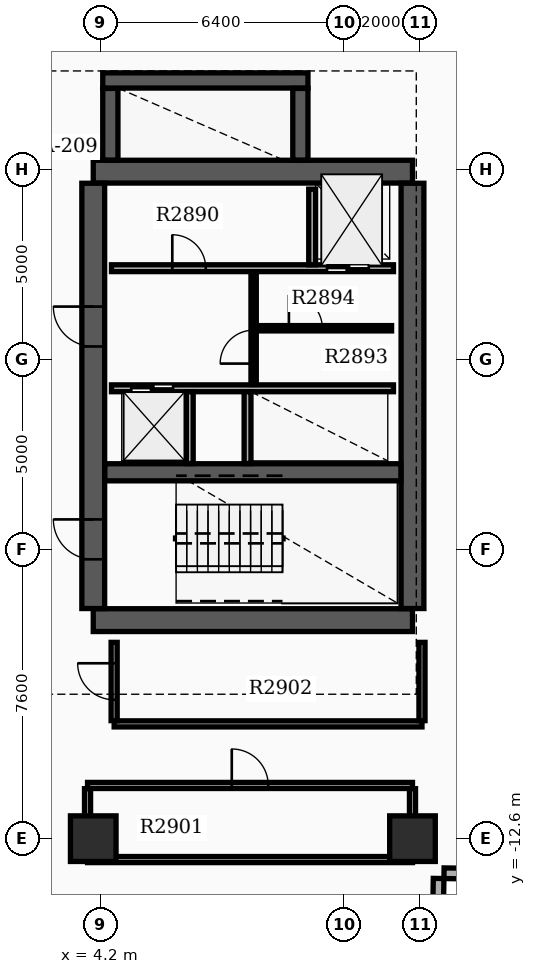
"""IFC4 building model, lengths in metres.
Left out: names, types, materials, properties, quantities, classifications, styles, units other than length and angle.
Written with IfcOpenShell. Run it as: python <this file> out.ifc"""

import sys

from ifc_helpers import new_model, si_unit, direction, frame, frame_2d, origin, origin_2d, place, context, subcontext, project, spatial, rectangle, extrude, element, fill, save


model = new_model("IFC4")
c1 = context("Model", 3, precision=1e-05, world=origin(), true_north=direction((0.0, 1.0)))
c2 = subcontext(c1, "Body", "Model", "MODEL_VIEW")
j1 = project(units=[si_unit("LENGTHUNIT", "METRE"), si_unit("PLANEANGLEUNIT", "RADIAN")], contexts=[c1])
p1 = place(None, origin())
s1 = spatial("IfcSite", under=j1, at=p1, CompositionType="ELEMENT")
p2 = place(p1, origin())
s2 = spatial("IfcBuilding", under=s1, at=p2, CompositionType="ELEMENT")
p3 = place(p2, frame((0.0, 0.0, 180.0)))
s3 = spatial("IfcBuildingStorey", under=s2, at=p3, CompositionType="ELEMENT", Elevation=180.0)
for number, where, z_axis, x_axis in (
    (1, (4.0, -6.85, 0.0), (0.0, 0.0, 1.0), (1.0, 0.0, 0.0)),
    (2, (4.0, 4.95, 0.0), (0.0, 0.0, 1.0), (1.0, 0.0, 0.0)),
):
    element("IfcWall", number, at=place(p3, frame(where, z_axis=z_axis, x_axis=x_axis)), inside=s3, PredefinedType="SHEAR", context=c2, shape_type="SweptSolid", body=[
        extrude(rectangle(XDim=8.4, YDim=0.6, at=frame_2d((4.2, 0.0))), origin(), (0.0, 0.0, 1.0), 3.7),
    ])
p4 = place(p3, frame((4.0, -6.545, 0.0), z_axis=(0.0, 0.0, 1.0), x_axis=(0.0, 1.0, 0.0)))
e3 = element("IfcWall", 3, at=p4, inside=s3, PredefinedType="SHEAR", context=c2, shape_type="SweptSolid", body=[
    extrude(rectangle(XDim=11.19, YDim=0.6, at=frame_2d((5.595, 0.0))), origin(), (0.0, 0.0, 1.0), 3.7),
])
p5 = place(p4, frame((1.295, 0.0, 0.0)))
e4 = element("IfcOpeningElement", 4, at=p5, cuts=e3, PredefinedType="OPENING", context=c2, shape_type="SweptSolid", body=[
    extrude(rectangle(XDim=1.05, YDim=2.15, at=frame_2d((0.525, 1.075))), frame((0.0, 0.31, 0.0), z_axis=(0.0, -1.0, 0.0), x_axis=(1.0, 0.0, 0.0)), (0.0, 0.0, 1.0), 0.62),
])
p6 = place(p4, frame((6.895, 0.0, 0.0)))
e5 = element("IfcOpeningElement", 5, at=p6, cuts=e3, PredefinedType="OPENING", context=c2, shape_type="SweptSolid", body=[
    extrude(rectangle(XDim=1.05, YDim=2.15, at=frame_2d((0.525, 1.075))), frame((0.0, 0.31, 0.0), z_axis=(0.0, -1.0, 0.0), x_axis=(1.0, 0.0, 0.0)), (0.0, 0.0, 1.0), 0.62),
])
p7 = place(p3, frame((12.4, -6.545, 0.0), z_axis=(0.0, 0.0, 1.0), x_axis=(0.0, 1.0, 0.0)))
e6 = element("IfcWall", 6, at=p7, inside=s3, PredefinedType="SHEAR", context=c2, shape_type="SweptSolid", body=[
    extrude(rectangle(XDim=11.19, YDim=0.6, at=frame_2d((5.595, 0.0))), origin(), (0.0, 0.0, 1.0), 3.7),
])
p8 = place(p3, frame((4.305, -2.96, 0.0), z_axis=(0.0, 0.0, 1.0), x_axis=(1.0, 0.0, 0.0)))
e7 = element("IfcWall", 7, at=p8, inside=s3, PredefinedType="SHEAR", context=c2, shape_type="SweptSolid", body=[
    extrude(rectangle(XDim=7.79, YDim=0.45, at=frame_2d((3.895, 0.0))), origin(), (0.0, 0.0, 1.0), 3.7),
])
p9 = place(p3, frame((4.45, 5.255, 0.0), z_axis=(0.0, 0.0, 1.0), x_axis=(0.0, 1.0, 0.0)))
e8 = element("IfcWall", 8, at=p9, inside=s3, PredefinedType="SHEAR", context=c2, shape_type="SweptSolid", body=[
    extrude(rectangle(XDim=1.885, YDim=0.4, at=frame_2d((0.942, 0.0))), origin(), (0.0, 0.0, 1.0), 3.7),
])
p10 = place(p3, frame((4.25, 7.35, 0.0), z_axis=(0.0, 0.0, 1.0), x_axis=(1.0, 0.0, 0.0)))
e9 = element("IfcWall", 9, at=p10, inside=s3, PredefinedType="SHEAR", context=c2, shape_type="SweptSolid", body=[
    extrude(rectangle(XDim=5.4, YDim=0.4, at=frame_2d((2.7, 0.0))), origin(), (0.0, 0.0, 1.0), 3.7),
])
p11 = place(p3, frame((9.45, 5.255, 0.0), z_axis=(0.0, 0.0, 1.0), x_axis=(0.0, 1.0, 0.0)))
e10 = element("IfcWall", 10, at=p11, inside=s3, PredefinedType="SHEAR", context=c2, shape_type="SweptSolid", body=[
    extrude(rectangle(XDim=1.885, YDim=0.4, at=frame_2d((0.942, 0.0))), origin(), (0.0, 0.0, 1.0), 3.7),
])
for number, where, z_axis, x_axis in (
    (11, (12.4, -12.6, 0.0), (0.0, 0.0, 1.0), (1.0, 0.0, 0.0)),
    (12, (4.0, -12.6, 0.0), (0.0, 0.0, 1.0), (1.0, 0.0, 0.0)),
):
    element("IfcColumn", number, at=place(p3, frame(where, z_axis=z_axis, x_axis=x_axis)), inside=s3, PredefinedType="COLUMN", context=c2, shape_type="SweptSolid", body=[
        extrude(rectangle(XDim=1.2, YDim=1.2, at=origin_2d()), origin(), (0.0, 0.0, 1.0), 3.9),
    ])
p12 = place(p3, frame((14.449, -13.529, 0.0), z_axis=(0.0, 0.0, 1.0), x_axis=(-0.999878147354, 0.015610587569, 0.0)))
e13 = element("IfcWall", 13, at=p12, inside=s3, PredefinedType="STANDARD", context=c2, shape_type="SweptSolid", body=[
    extrude(rectangle(XDim=1.22, YDim=0.28, at=frame_2d((0.61, 0.0))), origin(), (0.0, 0.0, 1.0), 2.97),
])
p13 = place(p3, frame((13.087, -13.647, 0.0), z_axis=(0.0, 0.0, 1.0), x_axis=(-0.015785793208, -0.999875396603, 0.0)))
e14 = element("IfcWall", 14, at=p13, inside=s3, PredefinedType="STANDARD", context=c2, shape_type="SweptSolid", body=[
    extrude(rectangle(XDim=1.5, YDim=0.28, at=frame_2d((0.75, 0.0))), origin(), (0.0, 0.0, 1.0), 2.97),
])
p14 = place(p3, frame((4.48, 2.41, 0.0), z_axis=(0.0, 0.0, 1.0), x_axis=(1.0, 0.0, 0.0)))
e15 = element("IfcWall", 15, at=p14, inside=s3, PredefinedType="SOLIDWALL", context=c2, shape_type="SweptSolid", body=[
    extrude(rectangle(XDim=7.42, YDim=0.18, at=frame_2d((3.71, 0.0))), origin(), (0.0, 0.0, 1.0), 2.96),
])
p15 = place(p14, frame((5.67, 0.0, 0.0)))
e16 = element("IfcOpeningElement", 16, at=p15, cuts=e15, PredefinedType="OPENING", context=c2, shape_type="SweptSolid", body=[
    extrude(rectangle(XDim=1.1, YDim=2.15, at=frame_2d((0.55, 1.075))), frame((0.0, 0.1, 0.0), z_axis=(0.0, -1.0, 0.0), x_axis=(1.0, 0.0, 0.0)), (0.0, 0.0, 1.0), 0.2),
])
p16 = place(p14, frame((1.6, 0.0, 0.0)))
e17 = element("IfcOpeningElement", 17, at=p16, cuts=e15, PredefinedType="OPENING", context=c2, shape_type="SweptSolid", body=[
    extrude(rectangle(XDim=0.88, YDim=2.1, at=frame_2d((0.44, 1.05))), frame((0.0, 0.1, 0.0), z_axis=(0.0, -1.0, 0.0), x_axis=(1.0, 0.0, 0.0)), (0.0, 0.0, 1.0), 0.2),
])
p17 = place(p3, frame((4.48, -0.75, 0.0), z_axis=(0.0, 0.0, 1.0), x_axis=(1.0, 0.0, 0.0)))
e18 = element("IfcWall", 18, at=p17, inside=s3, PredefinedType="SOLIDWALL", context=c2, shape_type="SweptSolid", body=[
    extrude(rectangle(XDim=7.42, YDim=0.18, at=frame_2d((3.71, 0.0))), origin(), (0.0, 0.0, 1.0), 2.96),
])
p18 = place(p17, frame((0.52, 0.0, 0.0)))
e19 = element("IfcOpeningElement", 19, at=p18, cuts=e18, PredefinedType="OPENING", context=c2, shape_type="SweptSolid", body=[
    extrude(rectangle(XDim=1.1, YDim=2.15, at=frame_2d((0.55, 1.075))), frame((0.0, 0.1, 0.0), z_axis=(0.0, -1.0, 0.0), x_axis=(1.0, 0.0, 0.0)), (0.0, 0.0, 1.0), 0.2),
])
p19 = place(p3, frame((9.76, 2.5, 0.0), z_axis=(0.0, 0.0, 1.0), x_axis=(0.0, 1.0, 0.0)))
e20 = element("IfcWall", 20, at=p19, inside=s3, PredefinedType="SOLIDWALL", context=c2, shape_type="SweptSolid", body=[
    extrude(rectangle(XDim=1.99, YDim=0.18, at=frame_2d((0.995, 0.0))), origin(), (0.0, 0.0, 1.0), 2.96),
])
for number, where, z_axis, x_axis in (
    (21, (6.54, -2.73, 0.0), (0.0, 0.0, 1.0), (0.0, 1.0, 0.0)),
    (22, (8.06, -2.73, 0.0), (0.0, 0.0, 1.0), (0.0, 1.0, 0.0)),
):
    element("IfcWall", number, at=place(p3, frame(where, z_axis=z_axis, x_axis=x_axis)), inside=s3, PredefinedType="SOLIDWALL", context=c2, shape_type="SweptSolid", body=[
        extrude(rectangle(XDim=1.89, YDim=0.18, at=frame_2d((0.945, 0.0))), origin(), (0.0, 0.0, 1.0), 2.96),
    ])
p20 = place(p3, frame((8.22, -0.65, 0.0), z_axis=(0.0, 0.0, 1.0), x_axis=(0.0, 1.0, 0.0)))
e23 = element("IfcWall", 23, at=p20, inside=s3, PredefinedType="SOLIDWALL", context=c2, shape_type="SweptSolid", body=[
    extrude(rectangle(XDim=2.96, YDim=0.14, at=frame_2d((1.48, 0.0))), origin(), (0.0, 0.0, 1.0), 2.96),
])
p21 = place(p20, frame((0.55, 0.0, 0.0)))
e24 = element("IfcOpeningElement", 24, at=p21, cuts=e23, PredefinedType="OPENING", context=c2, shape_type="SweptSolid", body=[
    extrude(rectangle(XDim=0.88, YDim=2.1, at=frame_2d((0.44, 1.05))), frame((0.0, 0.08, 0.0), z_axis=(0.0, -1.0, 0.0), x_axis=(1.0, 0.0, 0.0)), (0.0, 0.0, 1.0), 0.16),
])
p22 = place(p3, frame((8.298, 0.83, 0.0), z_axis=(0.0, 0.0, 1.0), x_axis=(1.0, 0.0, 0.0)))
e25 = element("IfcWall", 25, at=p22, inside=s3, PredefinedType="PARTITIONING", context=c2, shape_type="SweptSolid", body=[
    extrude(rectangle(XDim=3.552, YDim=0.14, at=frame_2d((1.776, 0.0))), origin(), (0.0, 0.0, 1.0), 2.96),
])
p23 = place(p22, frame((0.85, 0.0, 0.0)))
e26 = element("IfcOpeningElement", 26, at=p23, cuts=e25, PredefinedType="OPENING", context=c2, shape_type="SweptSolid", body=[
    extrude(rectangle(XDim=0.88, YDim=2.1, at=frame_2d((0.44, 1.05))), frame((0.0, 0.08, 0.0), z_axis=(0.0, -1.0, 0.0), x_axis=(1.0, 0.0, 0.0)), (0.0, 0.0, 1.0), 0.16),
])
p24 = place(p3, frame((3.85, -13.15, 0.0), z_axis=(0.0, 0.0, 1.0), x_axis=(1.0, 0.0, 0.0)))
e27 = element("IfcWall", 27, at=p24, inside=s3, PredefinedType="PARTITIONING", context=c2, shape_type="SweptSolid", body=[
    extrude(rectangle(XDim=8.55, YDim=0.16, at=frame_2d((4.275, 0.0))), origin(), (0.0, 0.0, 1.0), 2.96),
])
p25 = place(p3, frame((3.85, -11.2, 0.0), z_axis=(0.0, 0.0, 1.0), x_axis=(1.0, 0.0, 0.0)))
e28 = element("IfcWall", 28, at=p25, inside=s3, PredefinedType="PARTITIONING", context=c2, shape_type="SweptSolid", body=[
    extrude(rectangle(XDim=8.55, YDim=0.16, at=frame_2d((4.275, 0.0))), origin(), (0.0, 0.0, 1.0), 2.96),
])
p26 = place(p25, frame((3.795, 0.0, 0.0)))
e29 = element("IfcOpeningElement", 29, at=p26, cuts=e28, PredefinedType="OPENING", context=c2, shape_type="SweptSolid", body=[
    extrude(rectangle(XDim=0.96, YDim=2.15, at=frame_2d((0.48, 1.075))), frame((0.0, 0.09, 0.0), z_axis=(0.0, -1.0, 0.0), x_axis=(1.0, 0.0, 0.0)), (0.0, 0.0, 1.0), 0.18),
])
for number, where, z_axis, x_axis in (
    (30, (3.85, -13.065, 0.0), (0.0, 0.0, 1.0), (0.0, 1.0, 0.0)),
    (31, (12.4, -13.065, 0.0), (0.0, 0.0, 1.0), (0.0, 1.0, 0.0)),
):
    element("IfcWall", number, at=place(p3, frame(where, z_axis=z_axis, x_axis=x_axis)), inside=s3, PredefinedType="PARTITIONING", context=c2, shape_type="SweptSolid", body=[
        extrude(rectangle(XDim=1.78, YDim=0.16, at=frame_2d((0.89, 0.0))), origin(), (0.0, 0.0, 1.0), 2.96),
    ])
p27 = place(p3, frame((4.55, -9.58, 0.0), z_axis=(0.0, 0.0, 1.0), x_axis=(1.0, 0.0, 0.0)))
e32 = element("IfcWall", 32, at=p27, inside=s3, PredefinedType="PARTITIONING", context=c2, shape_type="SweptSolid", body=[
    extrude(rectangle(XDim=8.1, YDim=0.16, at=frame_2d((4.05, 0.0))), origin(), (0.0, 0.0, 1.0), 2.96),
])
p28 = place(p3, frame((4.55, -9.495, 0.0), z_axis=(0.0, 0.0, 1.0), x_axis=(0.0, 1.0, 0.0)))
e33 = element("IfcWall", 33, at=p28, inside=s3, PredefinedType="PARTITIONING", context=c2, shape_type="SweptSolid", body=[
    extrude(rectangle(XDim=2.06, YDim=0.16, at=frame_2d((1.03, 0.0))), origin(), (0.0, 0.0, 1.0), 2.96),
])
p29 = place(p28, frame((0.55, 0.0, 0.0)))
e34 = element("IfcOpeningElement", 34, at=p29, cuts=e33, PredefinedType="OPENING", context=c2, shape_type="SweptSolid", body=[
    extrude(rectangle(XDim=0.96, YDim=2.15, at=frame_2d((0.48, 1.075))), frame((0.0, 0.09, 0.0), z_axis=(0.0, -1.0, 0.0), x_axis=(1.0, 0.0, 0.0)), (0.0, 0.0, 1.0), 0.18),
])
p30 = place(p3, frame((12.65, -9.495, 0.0), z_axis=(0.0, 0.0, 1.0), x_axis=(0.0, 1.0, 0.0)))
e35 = element("IfcWall", 35, at=p30, inside=s3, PredefinedType="PARTITIONING", context=c2, shape_type="SweptSolid", body=[
    extrude(rectangle(XDim=2.06, YDim=0.16, at=frame_2d((1.03, 0.0))), origin(), (0.0, 0.0, 1.0), 2.96),
])
p31 = place(p5, origin())
e36 = element("IfcDoor", 36, at=p31, inside=s3, OperationType="SINGLE_SWING_RIGHT", PredefinedType="DOOR", context=c2, shape_type="SweptSolid", body=[
    extrude(rectangle(XDim=1.05, YDim=2.15, at=frame_2d((0.525, 1.075))), frame((0.0, 0.025, 0.0), z_axis=(0.0, -1.0, 0.0), x_axis=(1.0, 0.0, 0.0)), (0.0, 0.0, 1.0), 0.05),
])
fill(e4, e36)
p32 = place(p6, origin())
e37 = element("IfcDoor", 37, at=p32, inside=s3, OperationType="SINGLE_SWING_RIGHT", PredefinedType="DOOR", context=c2, shape_type="SweptSolid", body=[
    extrude(rectangle(XDim=1.05, YDim=2.15, at=frame_2d((0.525, 1.075))), frame((0.0, 0.025, 0.0), z_axis=(0.0, -1.0, 0.0), x_axis=(1.0, 0.0, 0.0)), (0.0, 0.0, 1.0), 0.05),
])
fill(e5, e37)
p33 = place(p15, origin())
e38 = element("IfcDoor", 38, at=p33, inside=s3, OperationType="DOUBLE_DOOR_SLIDING", PredefinedType="DOOR", context=c2, shape_type="SweptSolid", body=[
    extrude(rectangle(XDim=1.1, YDim=2.15, at=frame_2d((0.55, 1.075))), frame((0.0, 0.025, 0.0), z_axis=(0.0, -1.0, 0.0), x_axis=(1.0, 0.0, 0.0)), (0.0, 0.0, 1.0), 0.05),
])
fill(e16, e38)
p34 = place(p18, origin())
e39 = element("IfcDoor", 39, at=p34, inside=s3, OperationType="DOUBLE_DOOR_SLIDING", PredefinedType="DOOR", context=c2, shape_type="SweptSolid", body=[
    extrude(rectangle(XDim=1.1, YDim=2.15, at=frame_2d((0.55, 1.075))), frame((0.0, 0.025, 0.0), z_axis=(0.0, -1.0, 0.0), x_axis=(1.0, 0.0, 0.0)), (0.0, 0.0, 1.0), 0.05),
])
fill(e19, e39)
p35 = place(p16, origin())
e40 = element("IfcDoor", 40, at=p35, inside=s3, OperationType="SINGLE_SWING_LEFT", PredefinedType="DOOR", context=c2, shape_type="SweptSolid", body=[
    extrude(rectangle(XDim=0.88, YDim=2.1, at=frame_2d((0.44, 1.05))), frame((0.0, 0.025, 0.0), z_axis=(0.0, -1.0, 0.0), x_axis=(1.0, 0.0, 0.0)), (0.0, 0.0, 1.0), 0.05),
])
fill(e17, e40)
p36 = place(p21, origin())
e41 = element("IfcDoor", 41, at=p36, inside=s3, OperationType="SINGLE_SWING_LEFT", PredefinedType="DOOR", context=c2, shape_type="SweptSolid", body=[
    extrude(rectangle(XDim=0.88, YDim=2.1, at=frame_2d((0.44, 1.05))), frame((0.0, 0.025, 0.0), z_axis=(0.0, -1.0, 0.0), x_axis=(1.0, 0.0, 0.0)), (0.0, 0.0, 1.0), 0.05),
])
fill(e24, e41)
p37 = place(p23, origin())
e42 = element("IfcDoor", 42, at=p37, inside=s3, OperationType="SINGLE_SWING_LEFT", PredefinedType="DOOR", context=c2, shape_type="SweptSolid", body=[
    extrude(rectangle(XDim=0.88, YDim=2.1, at=frame_2d((0.44, 1.05))), frame((0.0, 0.025, 0.0), z_axis=(0.0, -1.0, 0.0), x_axis=(1.0, 0.0, 0.0)), (0.0, 0.0, 1.0), 0.05),
])
fill(e26, e42)
p38 = place(p26, origin())
e43 = element("IfcDoor", 43, at=p38, inside=s3, OperationType="SINGLE_SWING_LEFT", PredefinedType="DOOR", context=c2, shape_type="SweptSolid", body=[
    extrude(rectangle(XDim=0.96, YDim=2.15, at=frame_2d((0.48, 1.075))), frame((0.0, 0.025, 0.0), z_axis=(0.0, -1.0, 0.0), x_axis=(1.0, 0.0, 0.0)), (0.0, 0.0, 1.0), 0.05),
])
fill(e29, e43)
p39 = place(p29, origin())
e44 = element("IfcDoor", 44, at=p39, inside=s3, OperationType="SINGLE_SWING_RIGHT", PredefinedType="DOOR", context=c2, shape_type="SweptSolid", body=[
    extrude(rectangle(XDim=0.96, YDim=2.15, at=frame_2d((0.48, 1.075))), frame((0.0, 0.025, 0.0), z_axis=(0.0, -1.0, 0.0), x_axis=(1.0, 0.0, 0.0)), (0.0, 0.0, 1.0), 0.05),
])
fill(e34, e44)
save(model, sys.argv[1])
